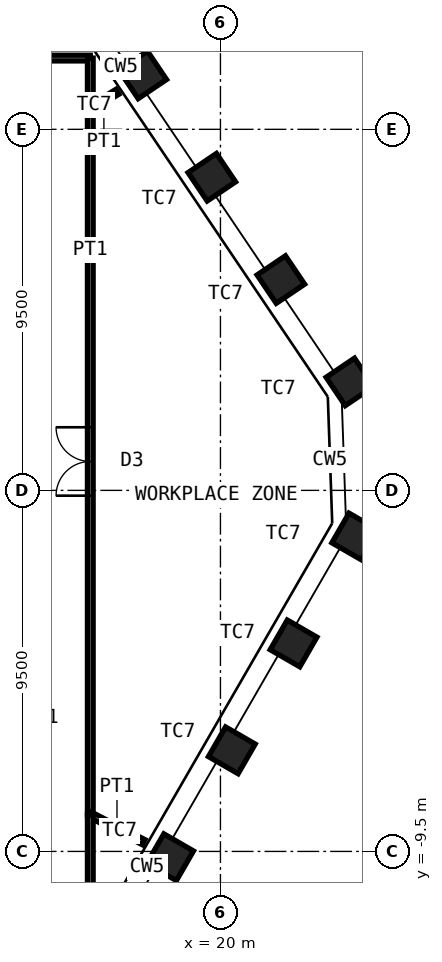
"""IFC4 building model, lengths in metres.
Left out: names, types, materials, properties, quantities, classifications, styles, units other than length and angle.
Written with IfcOpenShell. Run it as: python <this file> out.ifc"""

import sys

from ifc_helpers import new_model, si_unit, direction, frame, frame_2d, origin, origin_2d, place, context, subcontext, project, spatial, rectangle, hollow_rectangle, extrude, element, fill, save


model = new_model("IFC4")
c1 = context("Model", 3, precision=1e-05, world=origin(), true_north=direction((0.0, 1.0)))
c2 = subcontext(c1, "Body", "Model", "MODEL_VIEW")
j1 = project(units=[si_unit("LENGTHUNIT", "METRE"), si_unit("PLANEANGLEUNIT", "RADIAN")], contexts=[c1])
p1 = place(None, origin())
s1 = spatial("IfcSite", under=j1, at=p1, CompositionType="ELEMENT")
p2 = place(p1, origin())
s2 = spatial("IfcBuilding", under=s1, at=p2, CompositionType="ELEMENT")
p3 = place(p2, frame((0.0, 0.0, 295.6)))
s3 = spatial("IfcBuildingStorey", under=s2, at=p3, CompositionType="ELEMENT", Elevation=295.6)
for number, where, z_axis, x_axis in (
    (1, (17.957, 10.932, 0.0), (0.0, 0.0, 1.0), (-0.559, 0.829, 0.0)),
    (2, (19.773, 8.239, 0.0), (0.0, 0.0, 1.0), (-0.559, 0.829, 0.0)),
    (3, (21.589, 5.547, 0.0), (0.0, 0.0, 1.0), (-0.559, 0.829, 0.0)),
    (4, (23.406, 2.854, 0.0), (0.0, 0.0, 1.0), (-0.559, 0.829, 0.0)),
    (5, (23.548, -1.214, 0.0), (0.0, 0.0, 1.0), (0.5, 0.866, 0.0)),
    (6, (21.924, -4.027, 0.0), (0.0, 0.0, 1.0), (0.5, 0.866, 0.0)),
    (7, (20.3, -6.84, 0.0), (0.0, 0.0, 1.0), (0.5, 0.866, 0.0)),
    (8, (18.676, -9.653, 0.0), (0.0, 0.0, 1.0), (0.5, 0.866, 0.0)),
):
    element("IfcColumn", number, at=place(p3, frame(where, z_axis=z_axis, x_axis=x_axis)), inside=s3, PredefinedType="COLUMN", context=c2, shape_type="SweptSolid", body=[
        extrude(hollow_rectangle(XDim=0.9, YDim=0.9, WallThickness=0.06, at=origin_2d()), origin(), (0.0, 0.0, 1.0), 4.2),
    ])
p4 = place(p3, frame((13.375, 11.375, 0.0), z_axis=(0.0, 0.0, 1.0), x_axis=(1.0, 0.0, 0.0)))
e9 = element("IfcWall", 9, at=p4, inside=s3, PredefinedType="PARTITIONING", context=c2, shape_type="SweptSolid", body=[
    extrude(rectangle(XDim=3.2, YDim=0.15, at=frame_2d((1.6, 0.0))), origin(), (0.0, 0.0, 1.0), 4.03),
])
p5 = place(p4, frame((1.1, 0.0, 0.0)))
e10 = element("IfcOpeningElement", 10, at=p5, cuts=e9, PredefinedType="OPENING", context=c2, shape_type="SweptSolid", body=[
    extrude(rectangle(XDim=1.0, YDim=2.4, at=frame_2d((0.5, 1.2))), frame((0.0, 0.085, 0.0), z_axis=(0.0, -1.0, 0.0), x_axis=(1.0, 0.0, 0.0)), (0.0, 0.0, 1.0), 0.17),
])
p6 = place(p3, frame((16.575, 11.375, 0.0), z_axis=(0.0, 0.0, 1.0), x_axis=(0.0, -1.0, 0.0)))
e11 = element("IfcWall", 11, at=p6, inside=s3, PredefinedType="PARTITIONING", context=c2, shape_type="SweptSolid", body=[
    extrude(rectangle(XDim=1.321, YDim=0.15, at=frame_2d((0.66, 0.0))), origin(), (0.0, 0.0, 1.0), 4.03),
])
p7 = place(p3, frame((17.291, 10.489, 0.0), z_axis=(0.0, 0.0, 1.0), x_axis=(-0.855013745288, -0.518605336811, 0.0)))
e12 = element("IfcWall", 12, at=p7, inside=s3, PredefinedType="PARTITIONING", context=c2, shape_type="SweptSolid", body=[
    extrude(rectangle(XDim=0.837, YDim=0.15, at=frame_2d((0.419, 0.0))), origin(), (0.0, 0.0, 1.0), 2.93),
])
p8 = place(p3, frame((16.575, 10.054, 0.0), z_axis=(0.0, 0.0, 1.0), x_axis=(0.0, -1.0, 0.0)))
e13 = element("IfcWall", 13, at=p8, inside=s3, PredefinedType="PARTITIONING", context=c2, shape_type="SweptSolid", body=[
    extrude(rectangle(XDim=18.588, YDim=0.15, at=frame_2d((9.294, 0.0))), origin(), (0.0, 0.0, 1.0), 4.03),
])
p9 = place(p8, frame((8.394, 0.0, 0.0)))
e14 = element("IfcOpeningElement", 14, at=p9, cuts=e13, PredefinedType="OPENING", context=c2, shape_type="SweptSolid", body=[
    extrude(rectangle(XDim=1.8, YDim=2.4, at=frame_2d((0.9, 1.2))), frame((0.0, 0.085, 0.0), z_axis=(0.0, -1.0, 0.0), x_axis=(1.0, 0.0, 0.0)), (0.0, 0.0, 1.0), 0.17),
])
p10 = place(p3, frame((17.98, -9.257, 0.0), z_axis=(0.0, 0.0, 1.0), x_axis=(-0.88908312915, 0.457745769463, 0.0)))
e15 = element("IfcWall", 15, at=p10, inside=s3, PredefinedType="PARTITIONING", context=c2, shape_type="SweptSolid", body=[
    extrude(rectangle(XDim=1.581, YDim=0.15, at=frame_2d((0.791, 0.0))), origin(), (0.0, 0.0, 1.0), 2.93),
])
p11 = place(p3, frame((16.575, -8.533, 0.0), z_axis=(0.0, 0.0, 1.0), x_axis=(0.0, -1.0, 0.0)))
e16 = element("IfcWall", 16, at=p11, inside=s3, PredefinedType="PARTITIONING", context=c2, shape_type="SweptSolid", body=[
    extrude(rectangle(XDim=2.842, YDim=0.15, at=frame_2d((1.421, 0.0))), origin(), (0.0, 0.0, 1.0), 4.03),
])
p12 = place(p9, origin())
e17 = element("IfcDoor", 17, at=p12, inside=s3, OperationType="DOUBLE_DOOR_DOUBLE_SWING", PredefinedType="DOOR", context=c2, shape_type="SweptSolid", body=[
    extrude(rectangle(XDim=1.8, YDim=2.4, at=frame_2d((0.9, 1.2))), frame((0.0, 0.025, 0.0), z_axis=(0.0, -1.0, 0.0), x_axis=(1.0, 0.0, 0.0)), (0.0, 0.0, 1.0), 0.05),
])
fill(e14, e17)
save(model, sys.argv[1])
